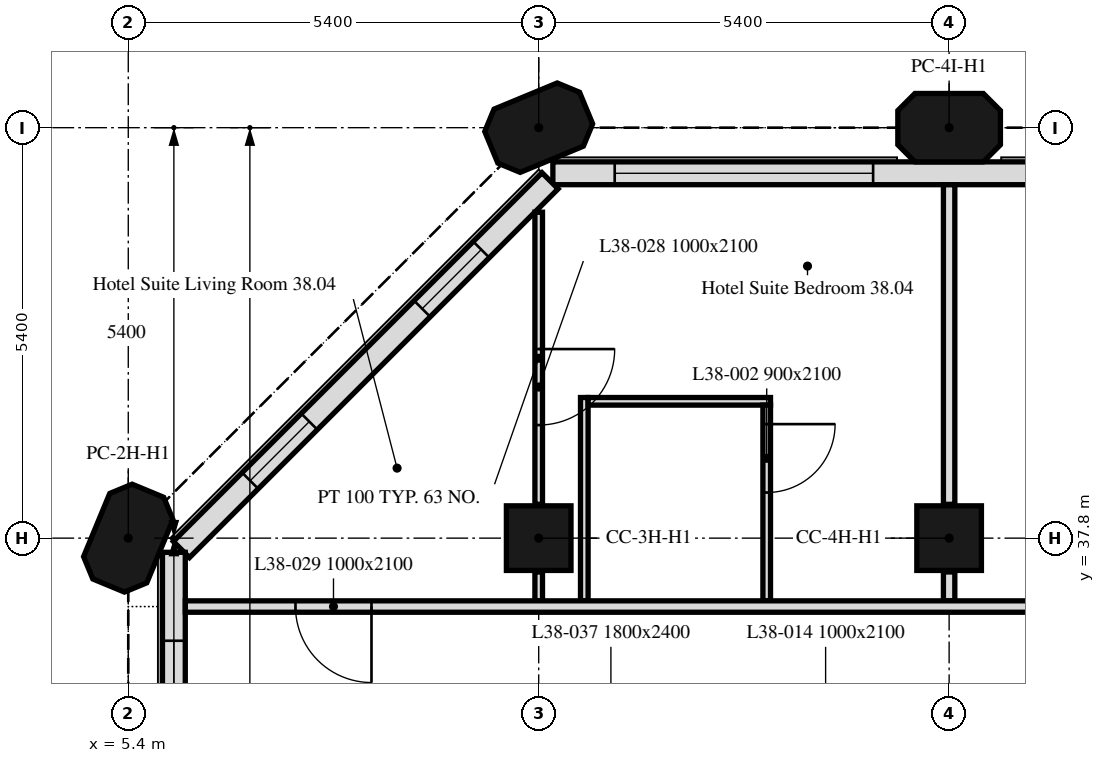
"""IFC4 building model, lengths in metres.
Left out: names, types, materials, properties, quantities, classifications, styles, units other than length and angle.
Written with IfcOpenShell. Run it as: python <this file> out.ifc"""

import sys

from ifc_helpers import new_model, si_unit, direction, frame, frame_2d, origin, origin_2d, place, context, subcontext, project, spatial, polyline, rectangle, outline, extrude, element, fill, save


model = new_model("IFC4")
c1 = context("Model", 3, precision=1e-05, world=origin(), true_north=direction((0.0, 1.0)))
c2 = subcontext(c1, "Body", "Model", "MODEL_VIEW")
j1 = project(units=[si_unit("LENGTHUNIT", "METRE"), si_unit("PLANEANGLEUNIT", "RADIAN")], contexts=[c1])
p1 = place(None, origin())
s1 = spatial("IfcSite", under=j1, at=p1, CompositionType="ELEMENT")
p2 = place(p1, origin())
s2 = spatial("IfcBuilding", under=s1, at=p2, CompositionType="ELEMENT")
p3 = place(p2, frame((0.0, 0.0, 162.7)))
s3 = spatial("IfcBuildingStorey", under=s2, at=p3, CompositionType="ELEMENT", Elevation=162.7)
p4 = place(p3, frame((5.4, 37.8, 0.0), z_axis=(0.0, 0.0, 1.0), x_axis=(0.382683432365, 0.923879532511, 0.0)))
e1 = element("IfcColumn", 1, at=p4, inside=s3, PredefinedType="COLUMN", context=c2, shape_type="SweptSolid", body=[
    extrude(outline(polyline([(-0.45, -0.45), (0.45, -0.45), (0.675, -0.225), (0.675, 0.225), (0.45, 0.45), (-0.45, 0.45), (-0.675, 0.225), (-0.675, -0.225), (-0.45, -0.45)])), origin(), (0.0, 0.0, 1.0), 3.0),
])
for number, where, z_axis, x_axis in (
    (2, (10.8, 37.8, 0.0), (0.0, 0.0, 1.0), (1.0, 0.0, 0.0)),
    (3, (16.2, 37.8, 0.0), (0.0, 0.0, 1.0), (1.0, 0.0, 0.0)),
):
    element("IfcColumn", number, at=place(p3, frame(where, z_axis=z_axis, x_axis=x_axis)), inside=s3, PredefinedType="COLUMN", context=c2, shape_type="SweptSolid", body=[
        extrude(rectangle(XDim=0.85, YDim=0.85, at=origin_2d()), origin(), (0.0, 0.0, 1.0), 3.0),
    ])
for number, where, z_axis, x_axis in (
    (4, (10.8, 43.2, 0.0), (0.0, 0.0, 1.0), (0.924, 0.383, 0.0)),
    (5, (16.2, 43.2, 0.0), (0.0, 0.0, 1.0), (1.0, 0.0, 0.0)),
):
    element("IfcColumn", number, at=place(p3, frame(where, z_axis=z_axis, x_axis=x_axis)), inside=s3, PredefinedType="COLUMN", context=c2, shape_type="SweptSolid", body=[
        extrude(outline(polyline([(-0.45, -0.45), (0.45, -0.45), (0.675, -0.225), (0.675, 0.225), (0.45, 0.45), (-0.45, 0.45), (-0.675, 0.225), (-0.675, -0.225), (-0.45, -0.45)])), origin(), (0.0, 0.0, 1.0), 3.0),
    ])
p5 = place(p3, frame((43.014, 42.6, 0.0), z_axis=(0.0, 0.0, 1.0), x_axis=(-1.0, 0.0, 0.0)))
e6 = element("IfcWall", 6, at=p5, inside=s3, PredefinedType="SOLIDWALL", context=c2, shape_type="SweptSolid", body=[
    extrude(rectangle(XDim=32.027, YDim=0.3, at=frame_2d((16.014, 0.0))), origin(), (0.0, 0.0, 1.0), 3.0),
])
p6 = place(p5, frame((2.764, 0.0, 0.9)))
e7 = element("IfcOpeningElement", 7, at=p6, cuts=e6, PredefinedType="OPENING", context=c2, shape_type="SweptSolid", body=[
    extrude(rectangle(XDim=1.1, YDim=1.7, at=frame_2d((0.55, 0.85))), frame((0.0, 0.16, 0.0), z_axis=(0.0, -1.0, 0.0), x_axis=(1.0, 0.0, 0.0)), (0.0, 0.0, 1.0), 0.32),
])
p7 = place(p5, frame((6.214, 0.0, 0.9)))
e8 = element("IfcOpeningElement", 8, at=p7, cuts=e6, PredefinedType="OPENING", context=c2, shape_type="SweptSolid", body=[
    extrude(rectangle(XDim=3.4, YDim=1.7, at=frame_2d((1.7, 0.85))), frame((0.0, 0.16, 0.0), z_axis=(0.0, -1.0, 0.0), x_axis=(1.0, 0.0, 0.0)), (0.0, 0.0, 1.0), 0.32),
])
p8 = place(p5, frame((13.564, 0.0, 0.9)))
e9 = element("IfcOpeningElement", 9, at=p8, cuts=e6, PredefinedType="OPENING", context=c2, shape_type="SweptSolid", body=[
    extrude(rectangle(XDim=1.1, YDim=1.7, at=frame_2d((0.55, 0.85))), frame((0.0, 0.16, 0.0), z_axis=(0.0, -1.0, 0.0), x_axis=(1.0, 0.0, 0.0)), (0.0, 0.0, 1.0), 0.32),
])
p9 = place(p5, frame((17.014, 0.0, 0.9)))
e10 = element("IfcOpeningElement", 10, at=p9, cuts=e6, PredefinedType="OPENING", context=c2, shape_type="SweptSolid", body=[
    extrude(rectangle(XDim=3.4, YDim=1.7, at=frame_2d((1.7, 0.85))), frame((0.0, 0.16, 0.0), z_axis=(0.0, -1.0, 0.0), x_axis=(1.0, 0.0, 0.0)), (0.0, 0.0, 1.0), 0.32),
])
p10 = place(p5, frame((24.364, 0.0, 0.9)))
e11 = element("IfcOpeningElement", 11, at=p10, cuts=e6, PredefinedType="OPENING", context=c2, shape_type="SweptSolid", body=[
    extrude(rectangle(XDim=1.1, YDim=1.7, at=frame_2d((0.55, 0.85))), frame((0.0, 0.16, 0.0), z_axis=(0.0, -1.0, 0.0), x_axis=(1.0, 0.0, 0.0)), (0.0, 0.0, 1.0), 0.32),
])
p11 = place(p5, frame((27.814, 0.0, 0.9)))
e12 = element("IfcOpeningElement", 12, at=p11, cuts=e6, PredefinedType="OPENING", context=c2, shape_type="SweptSolid", body=[
    extrude(rectangle(XDim=3.4, YDim=1.7, at=frame_2d((1.7, 0.85))), frame((0.0, 0.16, 0.0), z_axis=(0.0, -1.0, 0.0), x_axis=(1.0, 0.0, 0.0)), (0.0, 0.0, 1.0), 0.32),
])
p12 = place(p3, frame((10.949, 42.501, 0.0), z_axis=(0.0, 0.0, 1.0), x_axis=(-0.707106781187, -0.707106781187, 0.0)))
e13 = element("IfcWall", 13, at=p12, inside=s3, PredefinedType="SOLIDWALL", context=c2, shape_type="SweptSolid", body=[
    extrude(rectangle(XDim=6.86, YDim=0.3, at=frame_2d((3.43, 0.0))), origin(), (0.0, 0.0, 1.0), 3.0),
])
p13 = place(p12, frame((1.28, 0.0, 0.9)))
e14 = element("IfcOpeningElement", 14, at=p13, cuts=e13, PredefinedType="OPENING", context=c2, shape_type="SweptSolid", body=[
    extrude(rectangle(XDim=1.1, YDim=1.7, at=frame_2d((0.55, 0.85))), frame((0.0, 0.16, 0.0), z_axis=(0.0, -1.0, 0.0), x_axis=(1.0, 0.0, 0.0)), (0.0, 0.0, 1.0), 0.32),
])
p14 = place(p12, frame((4.48, 0.0, 0.9)))
e15 = element("IfcOpeningElement", 15, at=p14, cuts=e13, PredefinedType="OPENING", context=c2, shape_type="SweptSolid", body=[
    extrude(rectangle(XDim=1.1, YDim=1.7, at=frame_2d((0.55, 0.85))), frame((0.0, 0.16, 0.0), z_axis=(0.0, -1.0, 0.0), x_axis=(1.0, 0.0, 0.0)), (0.0, 0.0, 1.0), 0.32),
])
p15 = place(p3, frame((6.0, 37.614, 0.0), z_axis=(0.0, 0.0, 1.0), x_axis=(0.0, -1.0, 0.0)))
e16 = element("IfcWall", 16, at=p15, inside=s3, PredefinedType="SOLIDWALL", context=c2, shape_type="SweptSolid", body=[
    extrude(rectangle(XDim=5.214, YDim=0.3, at=frame_2d((2.607, 0.0))), origin(), (0.0, 0.0, 1.0), 3.0),
])
p16 = place(p15, frame((1.164, 0.0, 0.9)))
e17 = element("IfcOpeningElement", 17, at=p16, cuts=e16, PredefinedType="OPENING", context=c2, shape_type="SweptSolid", body=[
    extrude(rectangle(XDim=1.1, YDim=1.7, at=frame_2d((0.55, 0.85))), frame((0.0, 0.16, 0.0), z_axis=(0.0, -1.0, 0.0), x_axis=(1.0, 0.0, 0.0)), (0.0, 0.0, 1.0), 0.32),
])
p17 = place(p15, frame((2.764, 0.0, 0.9)))
e18 = element("IfcOpeningElement", 18, at=p17, cuts=e16, PredefinedType="OPENING", context=c2, shape_type="SweptSolid", body=[
    extrude(rectangle(XDim=1.1, YDim=1.7, at=frame_2d((0.55, 0.85))), frame((0.0, 0.16, 0.0), z_axis=(0.0, -1.0, 0.0), x_axis=(1.0, 0.0, 0.0)), (0.0, 0.0, 1.0), 0.32),
])
p18 = place(p3, frame((10.8, 42.088, 0.0), z_axis=(0.0, 0.0, 1.0), x_axis=(0.0, -1.0, 0.0)))
e19 = element("IfcWall", 19, at=p18, inside=s3, PredefinedType="PARTITIONING", context=c2, shape_type="SweptSolid", body=[
    extrude(rectangle(XDim=3.843, YDim=0.1, at=frame_2d((1.921, 0.0))), origin(), (0.0, 0.0, 1.0), 3.0),
])
p19 = place(p18, frame((1.8, 0.0, 0.0)))
e20 = element("IfcOpeningElement", 20, at=p19, cuts=e19, PredefinedType="OPENING", context=c2, shape_type="SweptSolid", body=[
    extrude(rectangle(XDim=1.0, YDim=2.1, at=frame_2d((0.5, 1.05))), frame((0.0, 0.05, 0.0), z_axis=(0.0, -1.0, 0.0), x_axis=(1.0, 0.0, 0.0)), (0.0, 0.0, 1.0), 0.1),
])
p20 = place(p3, frame((10.8, 37.355, 0.0), z_axis=(0.0, 0.0, 1.0), x_axis=(0.0, -1.0, 0.0)))
e21 = element("IfcWall", 21, at=p20, inside=s3, PredefinedType="PARTITIONING", context=c2, shape_type="SweptSolid", body=[
    extrude(rectangle(XDim=0.38, YDim=0.1, at=frame_2d((0.19, 0.0))), origin(), (0.0, 0.0, 1.0), 3.0),
])
p21 = place(p3, frame((11.4, 36.975, 0.0), z_axis=(0.0, 0.0, 1.0), x_axis=(0.0, 1.0, 0.0)))
e22 = element("IfcWall", 22, at=p21, inside=s3, PredefinedType="PARTITIONING", context=c2, shape_type="SweptSolid", body=[
    extrude(rectangle(XDim=2.675, YDim=0.1, at=frame_2d((1.337, 0.0))), origin(), (0.0, 0.0, 1.0), 3.0),
])
p22 = place(p3, frame((11.45, 39.6, 0.0), z_axis=(0.0, 0.0, 1.0), x_axis=(1.0, 0.0, 0.0)))
e23 = element("IfcWall", 23, at=p22, inside=s3, PredefinedType="PARTITIONING", context=c2, shape_type="SweptSolid", body=[
    extrude(rectangle(XDim=2.4, YDim=0.1, at=frame_2d((1.2, 0.0))), origin(), (0.0, 0.0, 1.0), 3.0),
])
p23 = place(p3, frame((13.8, 39.55, 0.0), z_axis=(0.0, 0.0, 1.0), x_axis=(0.0, -1.0, 0.0)))
e24 = element("IfcWall", 24, at=p23, inside=s3, PredefinedType="PARTITIONING", context=c2, shape_type="SweptSolid", body=[
    extrude(rectangle(XDim=2.575, YDim=0.1, at=frame_2d((1.288, 0.0))), origin(), (0.0, 0.0, 1.0), 3.0),
])
p24 = place(p23, frame((0.25, 0.0, 0.0)))
e25 = element("IfcOpeningElement", 25, at=p24, cuts=e24, PredefinedType="OPENING", context=c2, shape_type="SweptSolid", body=[
    extrude(rectangle(XDim=0.9, YDim=2.1, at=frame_2d((0.45, 1.05))), frame((0.0, 0.05, 0.0), z_axis=(0.0, -1.0, 0.0), x_axis=(1.0, 0.0, 0.0)), (0.0, 0.0, 1.0), 0.1),
])
p25 = place(p3, frame((16.2, 36.975, 0.0), z_axis=(0.0, 0.0, 1.0), x_axis=(0.0, 1.0, 0.0)))
e26 = element("IfcWall", 26, at=p25, inside=s3, PredefinedType="PARTITIONING", context=c2, shape_type="SweptSolid", body=[
    extrude(rectangle(XDim=0.38, YDim=0.15, at=frame_2d((0.19, 0.0))), origin(), (0.0, 0.0, 1.0), 3.0),
])
p26 = place(p3, frame((16.2, 38.245, 0.0), z_axis=(0.0, 0.0, 1.0), x_axis=(0.0, 1.0, 0.0)))
e27 = element("IfcWall", 27, at=p26, inside=s3, PredefinedType="PARTITIONING", context=c2, shape_type="SweptSolid", body=[
    extrude(rectangle(XDim=4.204, YDim=0.15, at=frame_2d((2.102, 0.0))), origin(), (0.0, 0.0, 1.0), 3.0),
])
p27 = place(p3, frame((47.849, 36.9, 0.0), z_axis=(0.0, 0.0, 1.0), x_axis=(-1.0, 0.0, 0.0)))
e28 = element("IfcWall", 28, at=p27, inside=s3, PredefinedType="PARTITIONING", context=c2, shape_type="SweptSolid", body=[
    extrude(rectangle(XDim=41.698, YDim=0.15, at=frame_2d((20.849, 0.0))), origin(), (0.0, 0.0, 1.0), 3.0),
])
p28 = place(p27, frame((39.249, 0.0, 0.0)))
e29 = element("IfcOpeningElement", 29, at=p28, cuts=e28, PredefinedType="OPENING", context=c2, shape_type="SweptSolid", body=[
    extrude(rectangle(XDim=1.0, YDim=2.1, at=frame_2d((0.5, 1.05))), frame((0.0, 0.075, 0.0), z_axis=(0.0, -1.0, 0.0), x_axis=(1.0, 0.0, 0.0)), (0.0, 0.0, 1.0), 0.15),
])
p29 = place(p27, frame((28.449, 0.0, 0.0)))
e30 = element("IfcOpeningElement", 30, at=p29, cuts=e28, PredefinedType="OPENING", context=c2, shape_type="SweptSolid", body=[
    extrude(rectangle(XDim=1.0, YDim=2.1, at=frame_2d((0.5, 1.05))), frame((0.0, 0.075, 0.0), z_axis=(0.0, -1.0, 0.0), x_axis=(1.0, 0.0, 0.0)), (0.0, 0.0, 1.0), 0.15),
])
p30 = place(p27, frame((16.849, 0.0, 0.0)))
e31 = element("IfcOpeningElement", 31, at=p30, cuts=e28, PredefinedType="OPENING", context=c2, shape_type="SweptSolid", body=[
    extrude(rectangle(XDim=1.0, YDim=2.1, at=frame_2d((0.5, 1.05))), frame((0.0, 0.075, 0.0), z_axis=(0.0, -1.0, 0.0), x_axis=(1.0, 0.0, 0.0)), (0.0, 0.0, 1.0), 0.15),
])
p31 = place(p27, frame((11.449, 0.0, 0.0)))
e32 = element("IfcOpeningElement", 32, at=p31, cuts=e28, PredefinedType="OPENING", context=c2, shape_type="SweptSolid", body=[
    extrude(rectangle(XDim=1.0, YDim=2.1, at=frame_2d((0.5, 1.05))), frame((0.0, 0.075, 0.0), z_axis=(0.0, -1.0, 0.0), x_axis=(1.0, 0.0, 0.0)), (0.0, 0.0, 1.0), 0.15),
])
p32 = place(p27, frame((2.744, 0.0, 0.0)))
e33 = element("IfcOpeningElement", 33, at=p32, cuts=e28, PredefinedType="OPENING", context=c2, shape_type="SweptSolid", body=[
    extrude(rectangle(XDim=1.0, YDim=2.1, at=frame_2d((0.5, 1.05))), frame((0.0, 0.075, 0.0), z_axis=(0.0, -1.0, 0.0), x_axis=(1.0, 0.0, 0.0)), (0.0, 0.0, 1.0), 0.15),
])
p33 = place(p11, origin())
e34 = element("IfcWindow", 34, at=p33, inside=s3, PartitioningType="SINGLE_PANEL", PredefinedType="WINDOW", context=c2, shape_type="SweptSolid", body=[
    extrude(rectangle(XDim=3.4, YDim=1.7, at=frame_2d((1.7, 0.85))), frame((0.0, 0.03, 0.0), z_axis=(0.0, -1.0, 0.0), x_axis=(1.0, 0.0, 0.0)), (0.0, 0.0, 1.0), 0.06),
])
fill(e12, e34)
p34 = place(p13, origin())
e35 = element("IfcWindow", 35, at=p34, inside=s3, PartitioningType="SINGLE_PANEL", PredefinedType="WINDOW", context=c2, shape_type="SweptSolid", body=[
    extrude(rectangle(XDim=1.1, YDim=1.7, at=frame_2d((0.55, 0.85))), frame((0.0, 0.03, 0.0), z_axis=(0.0, -1.0, 0.0), x_axis=(1.0, 0.0, 0.0)), (0.0, 0.0, 1.0), 0.06),
])
fill(e14, e35)
p35 = place(p14, origin())
e36 = element("IfcWindow", 36, at=p35, inside=s3, PartitioningType="SINGLE_PANEL", PredefinedType="WINDOW", context=c2, shape_type="SweptSolid", body=[
    extrude(rectangle(XDim=1.1, YDim=1.7, at=frame_2d((0.55, 0.85))), frame((0.0, 0.03, 0.0), z_axis=(0.0, -1.0, 0.0), x_axis=(1.0, 0.0, 0.0)), (0.0, 0.0, 1.0), 0.06),
])
fill(e15, e36)
p36 = place(p16, origin())
e37 = element("IfcWindow", 37, at=p36, inside=s3, PartitioningType="SINGLE_PANEL", PredefinedType="WINDOW", context=c2, shape_type="SweptSolid", body=[
    extrude(rectangle(XDim=1.1, YDim=1.7, at=frame_2d((0.55, 0.85))), frame((0.0, 0.03, 0.0), z_axis=(0.0, -1.0, 0.0), x_axis=(1.0, 0.0, 0.0)), (0.0, 0.0, 1.0), 0.06),
])
fill(e17, e37)
p37 = place(p24, origin())
e38 = element("IfcDoor", 38, at=p37, inside=s3, OperationType="SINGLE_SWING_LEFT", PredefinedType="DOOR", context=c2, shape_type="SweptSolid", body=[
    extrude(rectangle(XDim=0.9, YDim=2.1, at=frame_2d((0.45, 1.05))), frame((0.0, 0.025, 0.0), z_axis=(0.0, -1.0, 0.0), x_axis=(1.0, 0.0, 0.0)), (0.0, 0.0, 1.0), 0.05),
])
fill(e25, e38)
p38 = place(p19, origin())
e39 = element("IfcDoor", 39, at=p38, inside=s3, OperationType="SINGLE_SWING_LEFT", PredefinedType="DOOR", context=c2, shape_type="SweptSolid", body=[
    extrude(rectangle(XDim=1.0, YDim=2.1, at=frame_2d((0.5, 1.05))), frame((0.0, 0.025, 0.0), z_axis=(0.0, -1.0, 0.0), x_axis=(1.0, 0.0, 0.0)), (0.0, 0.0, 1.0), 0.05),
])
fill(e20, e39)
p39 = place(p28, origin())
e40 = element("IfcDoor", 40, at=p39, inside=s3, OperationType="SINGLE_SWING_RIGHT", PredefinedType="DOOR", context=c2, shape_type="SweptSolid", body=[
    extrude(rectangle(XDim=1.0, YDim=2.1, at=frame_2d((0.5, 1.05))), frame((0.0, 0.025, 0.0), z_axis=(0.0, -1.0, 0.0), x_axis=(1.0, 0.0, 0.0)), (0.0, 0.0, 1.0), 0.05),
])
fill(e29, e40)
save(model, sys.argv[1])
